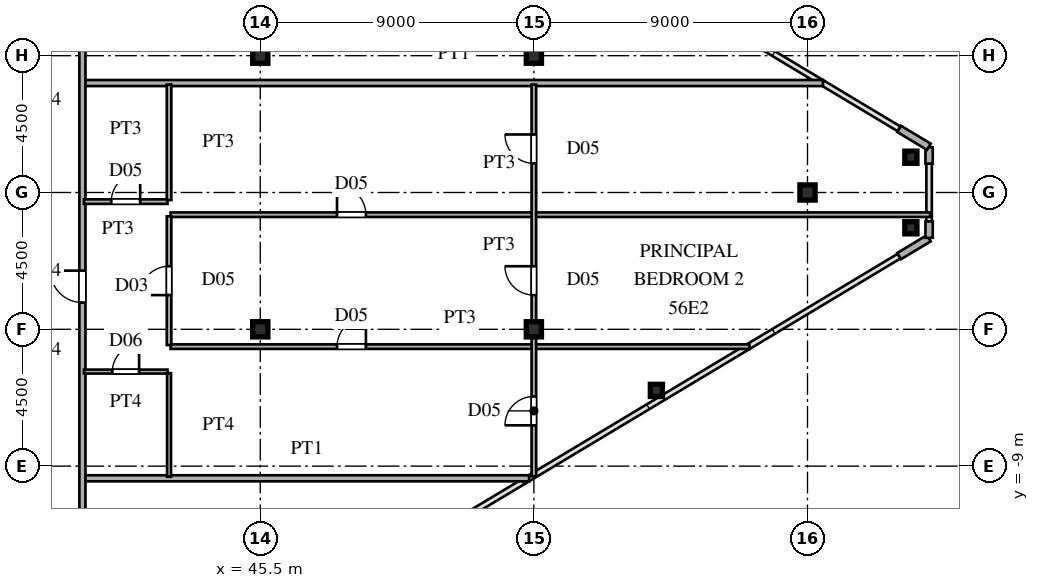
"""IFC4 building model, lengths in metres.
Left out: names, types, materials, properties, quantities, classifications, styles, units other than length and angle.
Written with IfcOpenShell. Run it as: python <this file> out.ifc"""

import sys

from ifc_helpers import new_model, si_unit, direction, frame, frame_2d, origin, origin_2d, place, context, subcontext, project, spatial, rectangle, hollow_rectangle, i_section, extrude, source, transform, mapped, element, fill, save


model = new_model("IFC4")
c1 = context("Model", 3, precision=1e-05, world=origin(), true_north=direction((0.0, 1.0)))
c2 = subcontext(c1, "Body", "Model", "MODEL_VIEW")
j1 = project(units=[si_unit("LENGTHUNIT", "METRE"), si_unit("PLANEANGLEUNIT", "RADIAN")], contexts=[c1])
p1 = place(None, origin())
s1 = spatial("IfcSite", under=j1, at=p1, CompositionType="ELEMENT")
p2 = place(p1, origin())
s2 = spatial("IfcBuilding", under=s1, at=p2, CompositionType="ELEMENT")
p3 = place(p2, frame((0.0, 0.0, 210.3)))
s3 = spatial("IfcBuildingStorey", under=s2, at=p3, CompositionType="ELEMENT", Elevation=210.3)
m1 = source(origin(), c2, "Body", "SweptSolid", [
    extrude(i_section(OverallWidth=0.5, OverallDepth=0.5, WebThickness=0.02, FlangeThickness=0.032, at=origin_2d()), origin(), (0.0, 0.0, 1.0), 3.6),
])
for number, where, z_axis, x_axis in (
    (1, (45.5, -4.5, 0.0), (0.0, 0.0, 1.0), (1.0, 0.0, 0.0)),
    (2, (45.5, 4.5, 0.0), (0.0, 0.0, 1.0), (1.0, 0.0, 0.0)),
    (3, (54.5, -4.5, 0.0), (0.0, 0.0, 1.0), (1.0, 0.0, 0.0)),
    (4, (54.5, 4.5, 0.0), (0.0, 0.0, 1.0), (1.0, 0.0, 0.0)),
    (5, (63.5, 0.0, 0.0), (0.0, 0.0, 1.0), (1.0, 0.0, 0.0)),
):
    element("IfcColumn", number, at=place(p3, frame(where, z_axis=z_axis, x_axis=x_axis)), inside=s3, PredefinedType="COLUMN", context=c2, shape_type="MappedRepresentation", body=[
        mapped(m1, transform((0.0, 0.0, 0.0), scale=1.0)),
    ])
m2 = source(origin(), c2, "Body", "SweptSolid", [
    extrude(hollow_rectangle(XDim=0.4, YDim=0.4, WallThickness=0.016, at=origin_2d()), origin(), (0.0, 0.0, 1.0), 3.6),
])
for number, where, z_axis, x_axis in (
    (6, (66.9, -1.16, 0.0), (0.0, 0.0, 1.0), (1.0, 0.0, 0.0)),
    (7, (66.9, 1.16, 0.0), (0.0, 0.0, 1.0), (1.0, 0.0, 0.0)),
    (8, (58.53, -6.509, 0.0), (0.0, 0.0, 1.0), (1.0, 0.0, 0.0)),
):
    element("IfcColumn", number, at=place(p3, frame(where, z_axis=z_axis, x_axis=x_axis)), inside=s3, PredefinedType="COLUMN", context=c2, shape_type="MappedRepresentation", body=[
        mapped(m2, transform((0.0, 0.0, 0.0), scale=1.0)),
    ])
p4 = place(p3, frame((66.514, -2.092, 0.0), z_axis=(0.0, 0.0, 1.0), x_axis=(0.85743623509, 0.514590228002, 0.0)))
e9 = element("IfcWall", 9, at=p4, inside=s3, PredefinedType="SOLIDWALL", context=c2, shape_type="SweptSolid", body=[
    extrude(rectangle(XDim=1.14, YDim=0.24, at=frame_2d((0.57, 0.0))), origin(), (0.0, 0.0, 1.0), 3.38),
])
for number, where, z_axis, x_axis in (
    (10, (67.5, -1.49, 0.0), (0.0, 0.0, 1.0), (0.0, 1.0, 0.0)),
    (11, (67.5, 0.95, 0.0), (0.0, 0.0, 1.0), (0.0, 1.0, 0.0)),
):
    element("IfcWall", number, at=place(p3, frame(where, z_axis=z_axis, x_axis=x_axis)), inside=s3, PredefinedType="SOLIDWALL", context=c2, shape_type="SweptSolid", body=[
        extrude(rectangle(XDim=0.54, YDim=0.24, at=frame_2d((0.27, 0.0))), origin(), (0.0, 0.0, 1.0), 3.38),
    ])
p5 = place(p3, frame((67.491, 1.505, 0.0), z_axis=(0.0, 0.0, 1.0), x_axis=(-0.85743623509, 0.514590228002, 0.0)))
e12 = element("IfcWall", 12, at=p5, inside=s3, PredefinedType="SOLIDWALL", context=c2, shape_type="SweptSolid", body=[
    extrude(rectangle(XDim=1.14, YDim=0.24, at=frame_2d((0.57, 0.0))), origin(), (0.0, 0.0, 1.0), 3.38),
])
p6 = place(p3, frame((39.73, -9.4, 0.0), z_axis=(0.0, 0.0, 1.0), x_axis=(1.0, 0.0, 0.0)))
e13 = element("IfcWall", 13, at=p6, inside=s3, PredefinedType="PARTITIONING", context=c2, shape_type="SweptSolid", body=[
    extrude(rectangle(XDim=14.613, YDim=0.2, at=frame_2d((7.307, 0.0))), origin(), (0.0, 0.0, 1.0), 3.38),
])
p7 = place(p3, frame((39.7, -5.89, 0.0), z_axis=(0.0, 0.0, 1.0), x_axis=(1.0, 0.0, 0.0)))
e14 = element("IfcWall", 14, at=p7, inside=s3, PredefinedType="PARTITIONING", context=c2, shape_type="SweptSolid", body=[
    extrude(rectangle(XDim=2.75, YDim=0.13, at=frame_2d((1.375, 0.0))), origin(), (0.0, 0.0, 1.0), 3.38),
])
p8 = place(p7, frame((0.935, 0.0, 0.0)))
e15 = element("IfcOpeningElement", 15, at=p8, cuts=e14, PredefinedType="OPENING", context=c2, shape_type="SweptSolid", body=[
    extrude(rectangle(XDim=0.88, YDim=2.1, at=frame_2d((0.44, 1.05))), frame((0.0, 0.075, 0.0), z_axis=(0.0, -1.0, 0.0), x_axis=(1.0, 0.0, 0.0)), (0.0, 0.0, 1.0), 0.15),
])
p9 = place(p3, frame((42.55, -5.07, 0.0), z_axis=(0.0, 0.0, 1.0), x_axis=(1.0, 0.0, 0.0)))
e16 = element("IfcWall", 16, at=p9, inside=s3, PredefinedType="PARTITIONING", context=c2, shape_type="SweptSolid", body=[
    extrude(rectangle(XDim=19.04, YDim=0.15, at=frame_2d((9.52, 0.0))), origin(), (0.0, 0.0, 1.0), 3.38),
])
p10 = place(p9, frame((5.475, 0.0, 0.0)))
e17 = element("IfcOpeningElement", 17, at=p10, cuts=e16, PredefinedType="OPENING", context=c2, shape_type="SweptSolid", body=[
    extrude(rectangle(XDim=0.95, YDim=2.15, at=frame_2d((0.475, 1.075))), frame((0.0, 0.085, 0.0), z_axis=(0.0, -1.0, 0.0), x_axis=(1.0, 0.0, 0.0)), (0.0, 0.0, 1.0), 0.17),
])
p11 = place(p3, frame((42.55, -0.73, 0.0), z_axis=(0.0, 0.0, 1.0), x_axis=(1.0, 0.0, 0.0)))
e18 = element("IfcWall", 18, at=p11, inside=s3, PredefinedType="PARTITIONING", context=c2, shape_type="SweptSolid", body=[
    extrude(rectangle(XDim=24.985, YDim=0.15, at=frame_2d((12.492, 0.0))), origin(), (0.0, 0.0, 1.0), 3.38),
])
p12 = place(p11, frame((5.475, 0.0, 0.0)))
e19 = element("IfcOpeningElement", 19, at=p12, cuts=e18, PredefinedType="OPENING", context=c2, shape_type="SweptSolid", body=[
    extrude(rectangle(XDim=0.95, YDim=2.15, at=frame_2d((0.475, 1.075))), frame((0.0, 0.085, 0.0), z_axis=(0.0, -1.0, 0.0), x_axis=(1.0, 0.0, 0.0)), (0.0, 0.0, 1.0), 0.17),
])
p13 = place(p3, frame((39.7, -0.3, 0.0), z_axis=(0.0, 0.0, 1.0), x_axis=(1.0, 0.0, 0.0)))
e20 = element("IfcWall", 20, at=p13, inside=s3, PredefinedType="PARTITIONING", context=c2, shape_type="SweptSolid", body=[
    extrude(rectangle(XDim=2.75, YDim=0.15, at=frame_2d((1.375, 0.0))), origin(), (0.0, 0.0, 1.0), 3.38),
])
p14 = place(p13, frame((0.9, 0.0, 0.0)))
e21 = element("IfcOpeningElement", 21, at=p14, cuts=e20, PredefinedType="OPENING", context=c2, shape_type="SweptSolid", body=[
    extrude(rectangle(XDim=0.95, YDim=2.15, at=frame_2d((0.475, 1.075))), frame((0.0, 0.085, 0.0), z_axis=(0.0, -1.0, 0.0), x_axis=(1.0, 0.0, 0.0)), (0.0, 0.0, 1.0), 0.17),
])
p15 = place(p3, frame((39.73, 3.6, 0.0), z_axis=(0.0, 0.0, 1.0), x_axis=(1.0, 0.0, 0.0)))
e22 = element("IfcWall", 22, at=p15, inside=s3, PredefinedType="PARTITIONING", context=c2, shape_type="SweptSolid", body=[
    extrude(rectangle(XDim=24.28, YDim=0.2, at=frame_2d((12.14, 0.0))), origin(), (0.0, 0.0, 1.0), 3.38),
])
p16 = place(p3, frame((39.65, -15.715, 0.0), z_axis=(0.0, 0.0, 1.0), x_axis=(0.0, 1.0, 0.0)))
e23 = element("IfcWall", 23, at=p16, inside=s3, PredefinedType="PARTITIONING", context=c2, shape_type="SweptSolid", body=[
    extrude(rectangle(XDim=31.43, YDim=0.2, at=frame_2d((15.715, 0.0))), origin(), (0.0, 0.0, 1.0), 3.38),
])
p17 = place(p16, frame((2.59, 0.0, 0.0)))
e24 = element("IfcOpeningElement", 24, at=p17, cuts=e23, PredefinedType="OPENING", context=c2, shape_type="SweptSolid", body=[
    extrude(rectangle(XDim=1.05, YDim=2.25, at=frame_2d((0.525, 1.125))), frame((0.0, 0.11, 0.0), z_axis=(0.0, -1.0, 0.0), x_axis=(1.0, 0.0, 0.0)), (0.0, 0.0, 1.0), 0.22),
])
p18 = place(p16, frame((12.095, 0.0, 0.0)))
e25 = element("IfcOpeningElement", 25, at=p18, cuts=e23, PredefinedType="OPENING", context=c2, shape_type="SweptSolid", body=[
    extrude(rectangle(XDim=1.05, YDim=2.25, at=frame_2d((0.525, 1.125))), frame((0.0, 0.11, 0.0), z_axis=(0.0, -1.0, 0.0), x_axis=(1.0, 0.0, 0.0)), (0.0, 0.0, 1.0), 0.22),
])
p19 = place(p16, frame((24.89, 0.0, 0.0)))
e26 = element("IfcOpeningElement", 26, at=p19, cuts=e23, PredefinedType="OPENING", context=c2, shape_type="SweptSolid", body=[
    extrude(rectangle(XDim=1.05, YDim=2.25, at=frame_2d((0.525, 1.125))), frame((0.0, 0.11, 0.0), z_axis=(0.0, -1.0, 0.0), x_axis=(1.0, 0.0, 0.0)), (0.0, 0.0, 1.0), 0.22),
])
p20 = place(p3, frame((42.5, -9.35, 0.0), z_axis=(0.0, 0.0, 1.0), x_axis=(0.0, 1.0, 0.0)))
e27 = element("IfcWall", 27, at=p20, inside=s3, PredefinedType="PARTITIONING", context=c2, shape_type="SweptSolid", body=[
    extrude(rectangle(XDim=3.408, YDim=0.13, at=frame_2d((1.704, 0.0))), origin(), (0.0, 0.0, 1.0), 3.38),
])
p21 = place(p3, frame((42.5, -5.017, 0.0), z_axis=(0.0, 0.0, 1.0), x_axis=(0.0, 1.0, 0.0)))
e28 = element("IfcWall", 28, at=p21, inside=s3, PredefinedType="PARTITIONING", context=c2, shape_type="SweptSolid", body=[
    extrude(rectangle(XDim=4.234, YDim=0.15, at=frame_2d((2.117, 0.0))), origin(), (0.0, 0.0, 1.0), 3.38),
])
p22 = place(p21, frame((1.642, 0.0, 0.0)))
e29 = element("IfcOpeningElement", 29, at=p22, cuts=e28, PredefinedType="OPENING", context=c2, shape_type="SweptSolid", body=[
    extrude(rectangle(XDim=0.95, YDim=2.15, at=frame_2d((0.475, 1.075))), frame((0.0, 0.085, 0.0), z_axis=(0.0, -1.0, 0.0), x_axis=(1.0, 0.0, 0.0)), (0.0, 0.0, 1.0), 0.17),
])
p23 = place(p3, frame((42.5, -0.248, 0.0), z_axis=(0.0, 0.0, 1.0), x_axis=(0.0, 1.0, 0.0)))
e30 = element("IfcWall", 30, at=p23, inside=s3, PredefinedType="PARTITIONING", context=c2, shape_type="SweptSolid", body=[
    extrude(rectangle(XDim=3.798, YDim=0.15, at=frame_2d((1.899, 0.0))), origin(), (0.0, 0.0, 1.0), 3.38),
])
p24 = place(p3, frame((54.5, -9.335, 0.0), z_axis=(0.0, 0.0, 1.0), x_axis=(0.0, 1.0, 0.0)))
e31 = element("IfcWall", 31, at=p24, inside=s3, PredefinedType="PARTITIONING", context=c2, shape_type="SweptSolid", body=[
    extrude(rectangle(XDim=12.885, YDim=0.15, at=frame_2d((6.442, 0.0))), origin(), (0.0, 0.0, 1.0), 2.78),
])
p25 = place(p24, frame((5.96, 0.0, 0.0)))
e32 = element("IfcOpeningElement", 32, at=p25, cuts=e31, PredefinedType="OPENING", context=c2, shape_type="SweptSolid", body=[
    extrude(rectangle(XDim=0.95, YDim=2.15, at=frame_2d((0.475, 1.075))), frame((0.0, 0.085, 0.0), z_axis=(0.0, -1.0, 0.0), x_axis=(1.0, 0.0, 0.0)), (0.0, 0.0, 1.0), 0.17),
])
p26 = place(p24, frame((1.677, 0.0, 0.0)))
e33 = element("IfcOpeningElement", 33, at=p26, cuts=e31, PredefinedType="OPENING", context=c2, shape_type="SweptSolid", body=[
    extrude(rectangle(XDim=0.95, YDim=2.15, at=frame_2d((0.475, 1.075))), frame((0.0, 0.085, 0.0), z_axis=(0.0, -1.0, 0.0), x_axis=(1.0, 0.0, 0.0)), (0.0, 0.0, 1.0), 0.17),
])
p27 = place(p24, frame((10.293, 0.0, 0.0)))
e34 = element("IfcOpeningElement", 34, at=p27, cuts=e31, PredefinedType="OPENING", context=c2, shape_type="SweptSolid", body=[
    extrude(rectangle(XDim=0.95, YDim=2.15, at=frame_2d((0.475, 1.075))), frame((0.0, 0.085, 0.0), z_axis=(0.0, -1.0, 0.0), x_axis=(1.0, 0.0, 0.0)), (0.0, 0.0, 1.0), 0.17),
])
m3 = source(origin(), c2, "Body", "SweptSolid", [
    extrude(rectangle(XDim=0.88, YDim=2.1, at=frame_2d((0.44, 1.05))), frame((0.0, 0.025, 0.0), z_axis=(0.0, -1.0, 0.0), x_axis=(1.0, 0.0, 0.0)), (0.0, 0.0, 1.0), 0.05),
])
p28 = place(p8, origin())
e35 = element("IfcDoor", 35, at=p28, inside=s3, OperationType="SINGLE_SWING_RIGHT", PredefinedType="DOOR", context=c2, shape_type="MappedRepresentation", body=[
    mapped(m3, transform((0.0, 0.0, 0.0), scale=1.0)),
])
fill(e15, e35)
m4 = source(origin(), c2, "Body", "SweptSolid", [
    extrude(rectangle(XDim=0.95, YDim=2.15, at=frame_2d((0.475, 1.075))), frame((0.0, 0.025, 0.0), z_axis=(0.0, -1.0, 0.0), x_axis=(1.0, 0.0, 0.0)), (0.0, 0.0, 1.0), 0.05),
])
p29 = place(p10, origin())
e36 = element("IfcDoor", 36, at=p29, inside=s3, OperationType="SINGLE_SWING_RIGHT", PredefinedType="DOOR", context=c2, shape_type="MappedRepresentation", body=[
    mapped(m4, transform((0.0, 0.0, 0.0), scale=1.0)),
])
fill(e17, e36)
p30 = place(p12, origin())
e37 = element("IfcDoor", 37, at=p30, inside=s3, OperationType="SINGLE_SWING_LEFT", PredefinedType="DOOR", context=c2, shape_type="MappedRepresentation", body=[
    mapped(m4, transform((0.0, 0.0, 0.0), scale=1.0)),
])
fill(e19, e37)
p31 = place(p14, origin())
e38 = element("IfcDoor", 38, at=p31, inside=s3, OperationType="SINGLE_SWING_RIGHT", PredefinedType="DOOR", context=c2, shape_type="MappedRepresentation", body=[
    mapped(m4, transform((0.0, 0.0, 0.0), scale=1.0)),
])
fill(e21, e38)
m5 = source(origin(), c2, "Body", "SweptSolid", [
    extrude(rectangle(XDim=1.05, YDim=2.25, at=frame_2d((0.525, 1.125))), frame((0.0, 0.025, 0.0), z_axis=(0.0, -1.0, 0.0), x_axis=(1.0, 0.0, 0.0)), (0.0, 0.0, 1.0), 0.05),
])
p32 = place(p18, origin())
e39 = element("IfcDoor", 39, at=p32, inside=s3, OperationType="SINGLE_SWING_RIGHT", PredefinedType="DOOR", context=c2, shape_type="MappedRepresentation", body=[
    mapped(m5, transform((0.0, 0.0, 0.0), scale=1.0)),
])
fill(e25, e39)
p33 = place(p22, origin())
e40 = element("IfcDoor", 40, at=p33, inside=s3, OperationType="SINGLE_SWING_LEFT", PredefinedType="DOOR", context=c2, shape_type="MappedRepresentation", body=[
    mapped(m4, transform((0.0, 0.0, 0.0), scale=1.0)),
])
fill(e29, e40)
p34 = place(p25, origin())
e41 = element("IfcDoor", 41, at=p34, inside=s3, OperationType="SINGLE_SWING_RIGHT", PredefinedType="DOOR", context=c2, shape_type="MappedRepresentation", body=[
    mapped(m4, transform((0.0, 0.0, 0.0), scale=1.0)),
])
fill(e32, e41)
p35 = place(p26, origin())
e42 = element("IfcDoor", 42, at=p35, inside=s3, OperationType="SINGLE_SWING_LEFT", PredefinedType="DOOR", context=c2, shape_type="MappedRepresentation", body=[
    mapped(m4, transform((0.0, 0.0, 0.0), scale=1.0)),
])
fill(e33, e42)
p36 = place(p27, origin())
e43 = element("IfcDoor", 43, at=p36, inside=s3, OperationType="SINGLE_SWING_RIGHT", PredefinedType="DOOR", context=c2, shape_type="MappedRepresentation", body=[
    mapped(m4, transform((0.0, 0.0, 0.0), scale=1.0)),
])
fill(e34, e43)
save(model, sys.argv[1])
